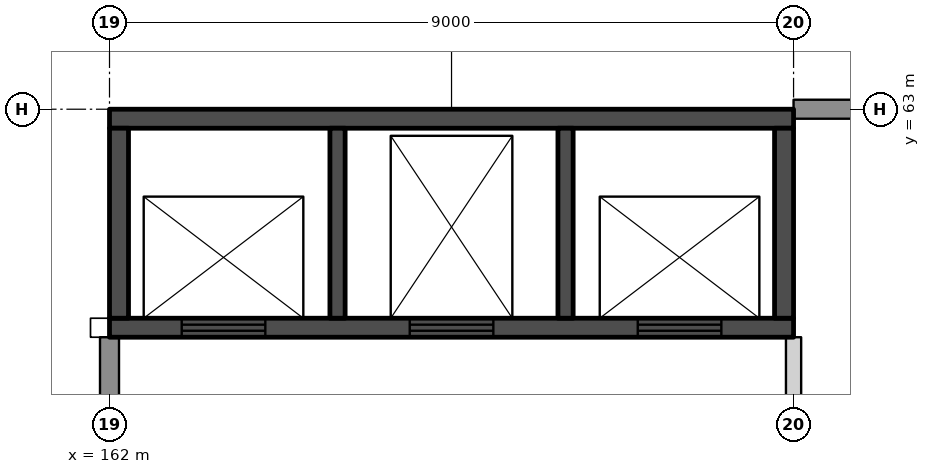
"""IFC4 building model, lengths in metres.
Left out: names, types, materials, properties, quantities, classifications, styles, units other than length and angle.
Written with IfcOpenShell. Run it as: python <this file> out.ifc"""

import sys

from ifc_helpers import new_model, si_unit, direction, frame, frame_2d, origin, place, context, subcontext, project, spatial, rectangle, extrude, element, fill, save


model = new_model("IFC4")
c1 = context("Model", 3, precision=1e-05, world=origin(), true_north=direction((0.0, 1.0)))
c2 = subcontext(c1, "Body", "Model", "MODEL_VIEW")
j1 = project(units=[si_unit("LENGTHUNIT", "METRE"), si_unit("PLANEANGLEUNIT", "RADIAN")], contexts=[c1])
p1 = place(None, origin())
s1 = spatial("IfcSite", under=j1, at=p1, CompositionType="ELEMENT")
p2 = place(p1, origin())
s2 = spatial("IfcBuilding", under=s1, at=p2, CompositionType="ELEMENT")
p3 = place(p2, frame((0.0, 0.0, 22.0)))
s3 = spatial("IfcBuildingStorey", under=s2, at=p3, CompositionType="ELEMENT", Elevation=22.0)
p4 = place(p3, frame((171.0, 54.35, 0.0), z_axis=(0.0, 0.0, 1.0), x_axis=(0.0, 1.0, 0.0)))
e1 = element("IfcWall", 1, at=p4, inside=s3, PredefinedType="PARTITIONING", context=c2, shape_type="SweptSolid", body=[
    extrude(rectangle(XDim=5.65, YDim=0.2, at=frame_2d((2.825, 0.0))), origin(), (0.0, 0.0, 1.0), 5.0),
])
p5 = place(p3, frame((162.0, 60.125, 0.0), z_axis=(0.0, 0.0, 1.0), x_axis=(1.0, 0.0, 0.0)))
e2 = element("IfcWall", 2, at=p5, inside=s3, PredefinedType="SHEAR", context=c2, shape_type="SweptSolid", body=[
    extrude(rectangle(XDim=9.0, YDim=0.25, at=frame_2d((4.5, 0.0))), origin(), (0.0, 0.0, 1.0), 6.0),
])
p6 = place(p5, frame((0.95, 0.0, 0.0)))
e3 = element("IfcOpeningElement", 3, at=p6, cuts=e2, PredefinedType="OPENING", context=c2, shape_type="SweptSolid", body=[
    extrude(rectangle(XDim=1.1, YDim=2.1, at=frame_2d((0.55, 1.05))), frame((0.0, 0.135, 0.0), z_axis=(0.0, -1.0, 0.0), x_axis=(1.0, 0.0, 0.0)), (0.0, 0.0, 1.0), 0.27),
])
p7 = place(p5, frame((3.95, 0.0, 0.0)))
e4 = element("IfcOpeningElement", 4, at=p7, cuts=e2, PredefinedType="OPENING", context=c2, shape_type="SweptSolid", body=[
    extrude(rectangle(XDim=1.1, YDim=2.1, at=frame_2d((0.55, 1.05))), frame((0.0, 0.135, 0.0), z_axis=(0.0, -1.0, 0.0), x_axis=(1.0, 0.0, 0.0)), (0.0, 0.0, 1.0), 0.27),
])
p8 = place(p5, frame((6.95, 0.0, 0.0)))
e5 = element("IfcOpeningElement", 5, at=p8, cuts=e2, PredefinedType="OPENING", context=c2, shape_type="SweptSolid", body=[
    extrude(rectangle(XDim=1.1, YDim=2.1, at=frame_2d((0.55, 1.05))), frame((0.0, 0.135, 0.0), z_axis=(0.0, -1.0, 0.0), x_axis=(1.0, 0.0, 0.0)), (0.0, 0.0, 1.0), 0.27),
])
p9 = place(p3, frame((162.0, 62.875, 0.0), z_axis=(0.0, 0.0, 1.0), x_axis=(1.0, 0.0, 0.0)))
e6 = element("IfcWall", 6, at=p9, inside=s3, PredefinedType="SHEAR", context=c2, shape_type="SweptSolid", body=[
    extrude(rectangle(XDim=9.0, YDim=0.25, at=frame_2d((4.5, 0.0))), origin(), (0.0, 0.0, 1.0), 6.0),
])
for number, where, z_axis, x_axis in (
    (7, (162.125, 60.25, 0.0), (0.0, 0.0, 1.0), (0.0, 1.0, 0.0)),
    (8, (170.875, 60.25, 0.0), (0.0, 0.0, 1.0), (0.0, 1.0, 0.0)),
):
    element("IfcWall", number, at=place(p3, frame(where, z_axis=z_axis, x_axis=x_axis)), inside=s3, PredefinedType="SHEAR", context=c2, shape_type="SweptSolid", body=[
        extrude(rectangle(XDim=2.5, YDim=0.25, at=frame_2d((1.25, 0.0))), origin(), (0.0, 0.0, 1.0), 6.0),
    ])
for number, where, z_axis, x_axis in (
    (9, (165.0, 60.25, 0.0), (0.0, 0.0, 1.0), (0.0, 1.0, 0.0)),
    (10, (168.0, 60.25, 0.0), (0.0, 0.0, 1.0), (0.0, 1.0, 0.0)),
):
    element("IfcWall", number, at=place(p3, frame(where, z_axis=z_axis, x_axis=x_axis)), inside=s3, PredefinedType="SHEAR", context=c2, shape_type="SweptSolid", body=[
        extrude(rectangle(XDim=2.5, YDim=0.2, at=frame_2d((1.25, 0.0))), origin(), (0.0, 0.0, 1.0), 6.0),
    ])
p10 = place(p3, frame((162.0, 54.35, 0.0), z_axis=(0.0, 0.0, 1.0), x_axis=(0.0, 1.0, 0.0)))
e11 = element("IfcWall", 11, at=p10, inside=s3, PredefinedType="SOLIDWALL", context=c2, shape_type="SweptSolid", body=[
    extrude(rectangle(XDim=5.65, YDim=0.25, at=frame_2d((2.825, 0.0))), origin(), (0.0, 0.0, 1.0), 5.0),
])
p11 = place(p3, frame((171.0, 63.0, 0.0), z_axis=(0.0, 0.0, 1.0), x_axis=(1.0, 0.0, 0.0)))
e12 = element("IfcWall", 12, at=p11, inside=s3, PredefinedType="SOLIDWALL", context=c2, shape_type="SweptSolid", body=[
    extrude(rectangle(XDim=9.0, YDim=0.25, at=frame_2d((4.5, 0.0))), origin(), (0.0, 0.0, 1.0), 4.7),
])
p12 = place(p6, origin())
e13 = element("IfcDoor", 13, at=p12, inside=s3, OperationType="DOUBLE_DOOR_SLIDING", PredefinedType="DOOR", context=c2, shape_type="SweptSolid", body=[
    extrude(rectangle(XDim=1.1, YDim=2.1, at=frame_2d((0.55, 1.05))), frame((0.0, 0.025, 0.0), z_axis=(0.0, -1.0, 0.0), x_axis=(1.0, 0.0, 0.0)), (0.0, 0.0, 1.0), 0.05),
])
fill(e3, e13)
p13 = place(p7, origin())
e14 = element("IfcDoor", 14, at=p13, inside=s3, OperationType="DOUBLE_DOOR_SLIDING", PredefinedType="DOOR", context=c2, shape_type="SweptSolid", body=[
    extrude(rectangle(XDim=1.1, YDim=2.1, at=frame_2d((0.55, 1.05))), frame((0.0, 0.025, 0.0), z_axis=(0.0, -1.0, 0.0), x_axis=(1.0, 0.0, 0.0)), (0.0, 0.0, 1.0), 0.05),
])
fill(e4, e14)
p14 = place(p8, origin())
e15 = element("IfcDoor", 15, at=p14, inside=s3, OperationType="DOUBLE_DOOR_SLIDING", PredefinedType="DOOR", context=c2, shape_type="SweptSolid", body=[
    extrude(rectangle(XDim=1.1, YDim=2.1, at=frame_2d((0.55, 1.05))), frame((0.0, 0.025, 0.0), z_axis=(0.0, -1.0, 0.0), x_axis=(1.0, 0.0, 0.0)), (0.0, 0.0, 1.0), 0.05),
])
fill(e5, e15)
save(model, sys.argv[1])
